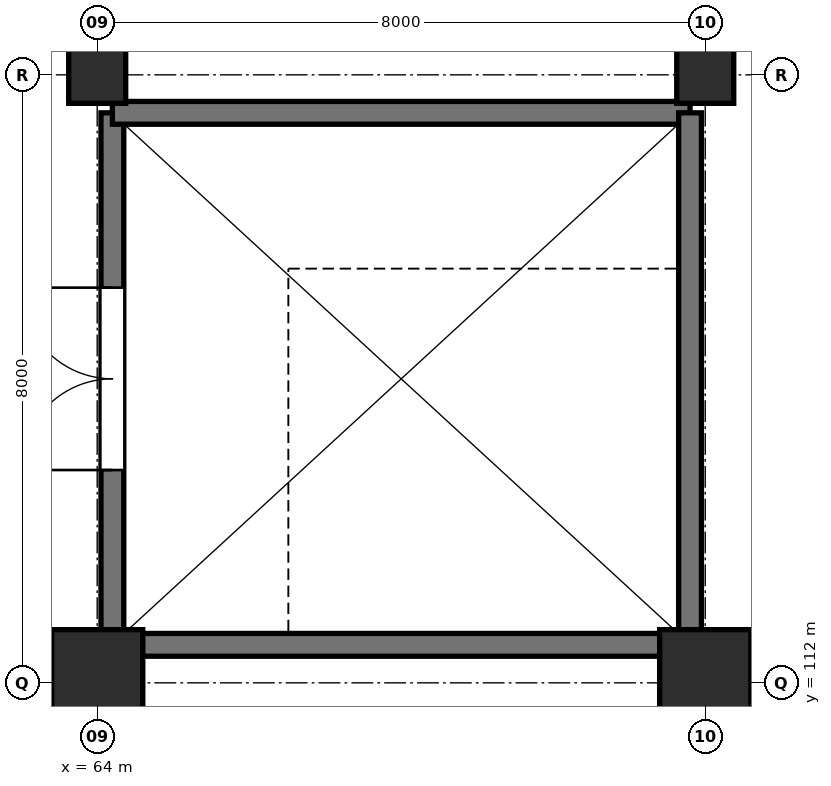
"""IFC4 building model, lengths in metres.
Left out: names, types, materials, properties, quantities, classifications, styles, units other than length and angle.
Written with IfcOpenShell. Run it as: python <this file> out.ifc"""

import sys

from ifc_helpers import new_model, si_unit, direction, frame, frame_2d, origin, origin_2d, place, context, subcontext, project, spatial, rectangle, extrude, element, fill, save


model = new_model("IFC4")
c1 = context("Model", 3, precision=1e-05, world=origin(), true_north=direction((0.0, 1.0)))
c2 = subcontext(c1, "Body", "Model", "MODEL_VIEW")
j1 = project(units=[si_unit("LENGTHUNIT", "METRE"), si_unit("PLANEANGLEUNIT", "RADIAN")], contexts=[c1])
p1 = place(None, origin())
s1 = spatial("IfcSite", under=j1, at=p1, CompositionType="ELEMENT")
p2 = place(p1, origin())
s2 = spatial("IfcBuilding", under=s1, at=p2, CompositionType="ELEMENT")
p3 = place(p2, frame((0.0, 0.0, 5.4)))
s3 = spatial("IfcBuildingStorey", under=s2, at=p3, CompositionType="ELEMENT", Elevation=5.4)
p4 = place(p3, frame((64.0, 112.0, 0.0), z_axis=(0.0, 0.0, 1.0), x_axis=(1.0, 0.0, 0.0)))
e1 = element("IfcColumn", 1, at=p4, inside=s3, PredefinedType="COLUMN", context=c2, shape_type="SweptSolid", body=[
    extrude(rectangle(XDim=1.2, YDim=1.4, at=origin_2d()), origin(), (0.0, 0.0, 1.0), 4.8),
])
p5 = place(p3, frame((64.0, 120.0, 0.0), z_axis=(0.0, 0.0, 1.0), x_axis=(1.0, 0.0, 0.0)))
e2 = element("IfcColumn", 2, at=p5, inside=s3, PredefinedType="COLUMN", context=c2, shape_type="SweptSolid", body=[
    extrude(rectangle(XDim=0.75, YDim=0.75, at=origin_2d()), origin(), (0.0, 0.0, 1.0), 4.8),
])
p6 = place(p3, frame((72.0, 112.0, 0.0), z_axis=(0.0, 0.0, 1.0), x_axis=(1.0, 0.0, 0.0)))
e3 = element("IfcColumn", 3, at=p6, inside=s3, PredefinedType="COLUMN", context=c2, shape_type="SweptSolid", body=[
    extrude(rectangle(XDim=1.2, YDim=1.4, at=origin_2d()), origin(), (0.0, 0.0, 1.0), 4.8),
])
p7 = place(p3, frame((72.0, 120.0, 0.0), z_axis=(0.0, 0.0, 1.0), x_axis=(1.0, 0.0, 0.0)))
e4 = element("IfcColumn", 4, at=p7, inside=s3, PredefinedType="COLUMN", context=c2, shape_type="SweptSolid", body=[
    extrude(rectangle(XDim=0.75, YDim=0.75, at=origin_2d()), origin(), (0.0, 0.0, 1.0), 4.8),
])
p8 = place(p3, frame((63.42, 112.0, 0.0), z_axis=(0.0, 0.0, 1.0), x_axis=(-1.0, 0.0, 0.0)))
e5 = element("IfcWall", 5, at=p8, inside=s3, PredefinedType="SOLIDWALL", context=c2, shape_type="SweptSolid", body=[
    extrude(rectangle(XDim=7.065, YDim=0.42, at=frame_2d((3.532, 0.0))), origin(), (0.0, 0.0, 1.0), 3.45),
])
p9 = place(p3, frame((71.8, 112.5, 0.0), z_axis=(0.0, 0.0, 1.0), x_axis=(-1.0, 0.0, 0.0)))
e6 = element("IfcWall", 6, at=p9, inside=s3, PredefinedType="SHEAR", context=c2, shape_type="SweptSolid", body=[
    extrude(rectangle(XDim=7.6, YDim=0.3, at=frame_2d((3.8, 0.0))), origin(), (0.0, 0.0, 1.0), 4.48),
])
p10 = place(p3, frame((64.2, 112.5, 0.0), z_axis=(0.0, 0.0, 1.0), x_axis=(0.0, 1.0, 0.0)))
e7 = element("IfcWall", 7, at=p10, inside=s3, PredefinedType="SHEAR", context=c2, shape_type="SweptSolid", body=[
    extrude(rectangle(XDim=7.0, YDim=0.3, at=frame_2d((3.5, 0.0))), origin(), (0.0, 0.0, 1.0), 4.48),
])
p11 = place(p10, frame((2.3, 0.0, 0.0)))
e8 = element("IfcOpeningElement", 8, at=p11, cuts=e7, PredefinedType="OPENING", context=c2, shape_type="SweptSolid", body=[
    extrude(rectangle(XDim=2.4, YDim=2.2, at=frame_2d((1.2, 1.1))), frame((0.0, 0.16, 0.0), z_axis=(0.0, -1.0, 0.0), x_axis=(1.0, 0.0, 0.0)), (0.0, 0.0, 1.0), 0.32),
])
p12 = place(p3, frame((64.2, 119.5, 0.0), z_axis=(0.0, 0.0, 1.0), x_axis=(1.0, 0.0, 0.0)))
e9 = element("IfcWall", 9, at=p12, inside=s3, PredefinedType="SHEAR", context=c2, shape_type="SweptSolid", body=[
    extrude(rectangle(XDim=7.6, YDim=0.3, at=frame_2d((3.8, 0.0))), origin(), (0.0, 0.0, 1.0), 4.48),
])
p13 = place(p3, frame((71.8, 119.5, 0.0), z_axis=(0.0, 0.0, 1.0), x_axis=(0.0, -1.0, 0.0)))
e10 = element("IfcWall", 10, at=p13, inside=s3, PredefinedType="SHEAR", context=c2, shape_type="SweptSolid", body=[
    extrude(rectangle(XDim=7.0, YDim=0.3, at=frame_2d((3.5, 0.0))), origin(), (0.0, 0.0, 1.0), 4.48),
])
p14 = place(p11, frame((2.4, 0.0, 0.0), z_axis=(0.0, 0.0, 1.0), x_axis=(-1.0, 0.0, 0.0)))
e11 = element("IfcDoor", 11, at=p14, inside=s3, OperationType="DOUBLE_DOOR_SINGLE_SWING", PredefinedType="DOOR", context=c2, shape_type="SweptSolid", body=[
    extrude(rectangle(XDim=2.4, YDim=2.2, at=frame_2d((1.2, 1.1))), frame((0.0, 0.025, 0.0), z_axis=(0.0, -1.0, 0.0), x_axis=(1.0, 0.0, 0.0)), (0.0, 0.0, 1.0), 0.05),
])
fill(e8, e11)
save(model, sys.argv[1])
